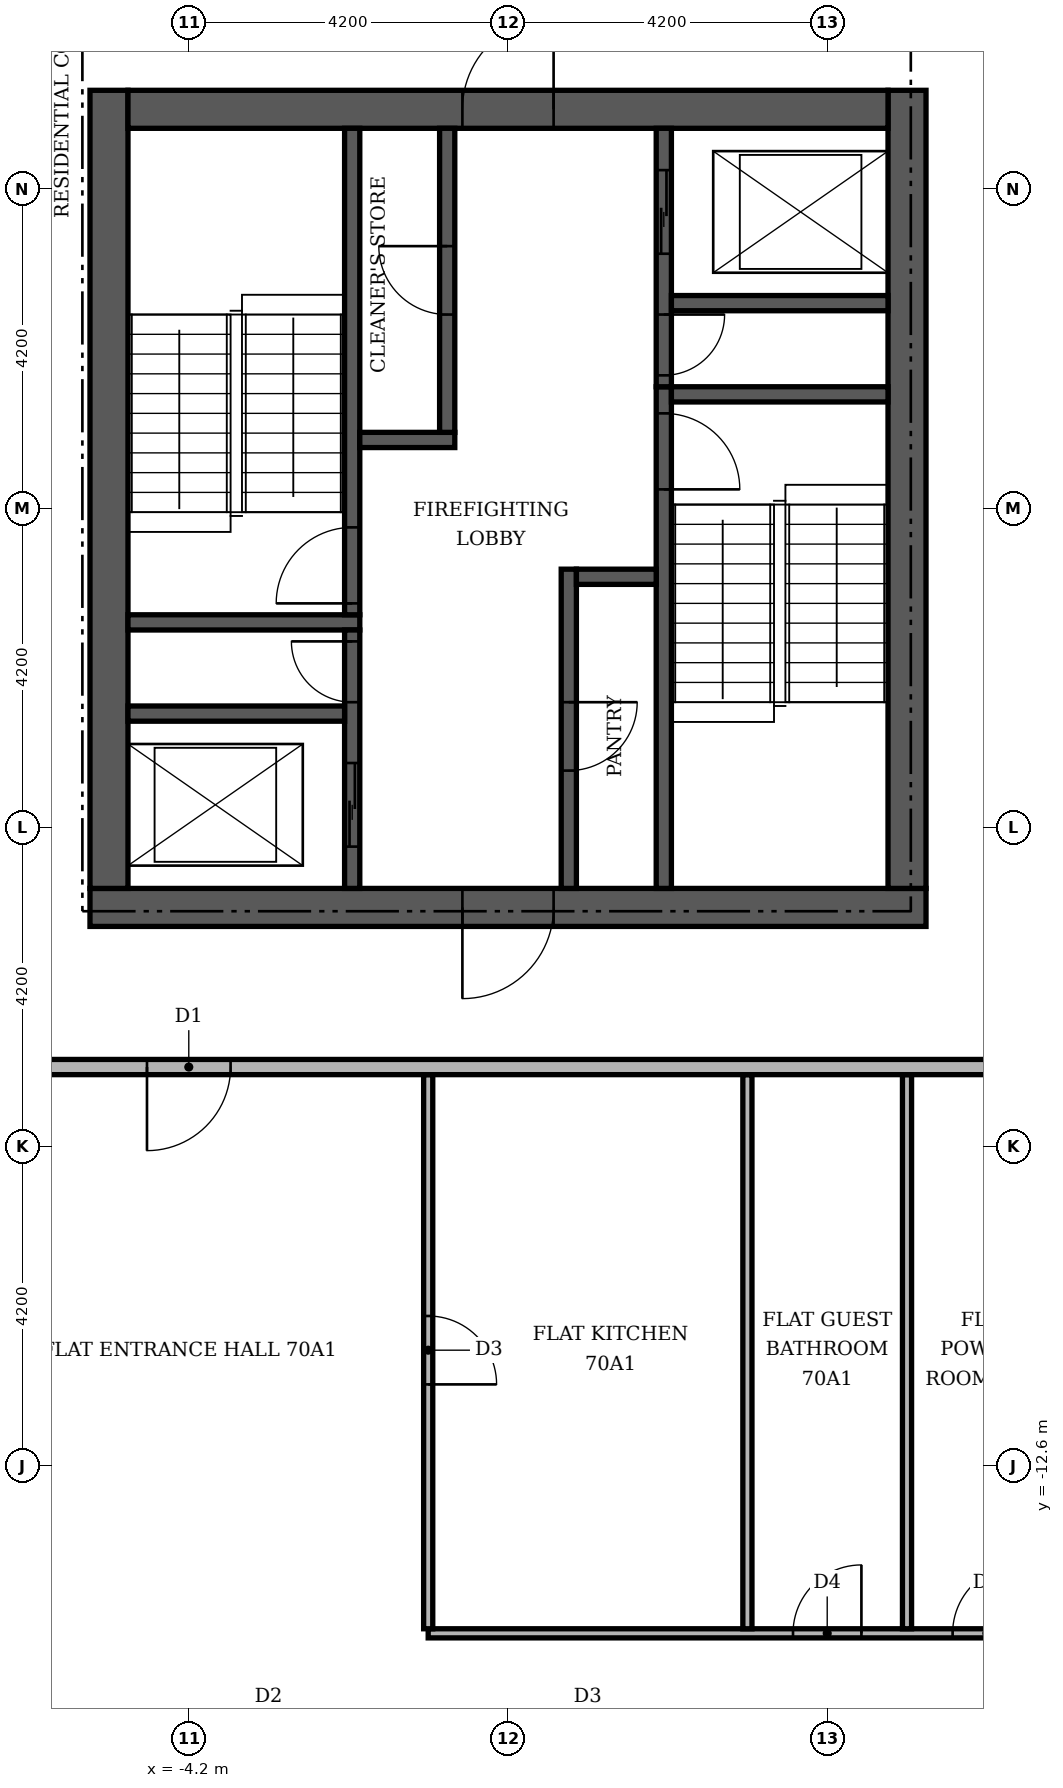
"""IFC4 building model, lengths in metres.
Left out: names, types, materials, properties, quantities, classifications, styles, units other than length and angle.
Written with IfcOpenShell. Run it as: python <this file> out.ifc"""

import sys

from ifc_helpers import new_model, si_unit, direction, frame, frame_2d, origin, place, context, subcontext, project, spatial, rectangle, extrude, element, fill, save


model = new_model("IFC4")
c1 = context("Model", 3, precision=1e-05, world=origin(), true_north=direction((0.0, 1.0)))
c2 = subcontext(c1, "Body", "Model", "MODEL_VIEW")
j1 = project(units=[si_unit("LENGTHUNIT", "METRE"), si_unit("PLANEANGLEUNIT", "RADIAN")], contexts=[c1])
p1 = place(None, origin())
s1 = spatial("IfcSite", under=j1, at=p1, CompositionType="ELEMENT")
p2 = place(p1, origin())
s2 = spatial("IfcBuilding", under=s1, at=p2, CompositionType="ELEMENT")
p3 = place(p2, frame((0.0, 0.0, 292.8)))
s3 = spatial("IfcBuildingStorey", under=s2, at=p3, CompositionType="ELEMENT", Elevation=292.8)
p4 = place(p3, frame((-5.5, -5.25, 0.0), z_axis=(0.0, 0.0, 1.0), x_axis=(1.0, 0.0, 0.0)))
e1 = element("IfcWall", 1, at=p4, inside=s3, PredefinedType="SHEAR", context=c2, shape_type="SweptSolid", body=[
    extrude(rectangle(XDim=11.0, YDim=0.5, at=frame_2d((5.5, 0.0))), origin(), (0.0, 0.0, 1.0), 3.55),
])
p5 = place(p4, frame((4.9, 0.0, 0.0)))
e2 = element("IfcOpeningElement", 2, at=p5, cuts=e1, PredefinedType="OPENING", context=c2, shape_type="SweptSolid", body=[
    extrude(rectangle(XDim=1.2, YDim=2.1, at=frame_2d((0.6, 1.05))), frame((0.0, 0.26, 0.0), z_axis=(0.0, -1.0, 0.0), x_axis=(1.0, 0.0, 0.0)), (0.0, 0.0, 1.0), 0.52),
])
for number, where, z_axis, x_axis in (
    (3, (-5.25, -5.0, 0.0), (0.0, 0.0, 1.0), (0.0, 1.0, 0.0)),
    (4, (5.25, -5.0, 0.0), (0.0, 0.0, 1.0), (0.0, 1.0, 0.0)),
):
    element("IfcWall", number, at=place(p3, frame(where, z_axis=z_axis, x_axis=x_axis)), inside=s3, PredefinedType="SHEAR", context=c2, shape_type="SweptSolid", body=[
        extrude(rectangle(XDim=10.5, YDim=0.5, at=frame_2d((5.25, 0.0))), origin(), (0.0, 0.0, 1.0), 3.55),
    ])
p6 = place(p3, frame((-5.0, 5.25, 0.0), z_axis=(0.0, 0.0, 1.0), x_axis=(1.0, 0.0, 0.0)))
e5 = element("IfcWall", 5, at=p6, inside=s3, PredefinedType="SHEAR", context=c2, shape_type="SweptSolid", body=[
    extrude(rectangle(XDim=10.0, YDim=0.5, at=frame_2d((5.0, 0.0))), origin(), (0.0, 0.0, 1.0), 3.55),
])
p7 = place(p6, frame((4.4, 0.0, 0.0)))
e6 = element("IfcOpeningElement", 6, at=p7, cuts=e5, PredefinedType="OPENING", context=c2, shape_type="SweptSolid", body=[
    extrude(rectangle(XDim=1.2, YDim=2.1, at=frame_2d((0.6, 1.05))), frame((0.0, 0.26, 0.0), z_axis=(0.0, -1.0, 0.0), x_axis=(1.0, 0.0, 0.0)), (0.0, 0.0, 1.0), 0.52),
])
p8 = place(p3, frame((2.05, -5.0, 0.0), z_axis=(0.0, 0.0, 1.0), x_axis=(0.0, 1.0, 0.0)))
e7 = element("IfcWall", 7, at=p8, inside=s3, PredefinedType="SHEAR", context=c2, shape_type="SweptSolid", body=[
    extrude(rectangle(XDim=6.6, YDim=0.2, at=frame_2d((3.3, 0.0))), origin(), (0.0, 0.0, 1.0), 3.55),
])
p9 = place(p8, frame((5.25, 0.0, 0.0)))
e8 = element("IfcOpeningElement", 8, at=p9, cuts=e7, PredefinedType="OPENING", context=c2, shape_type="SweptSolid", body=[
    extrude(rectangle(XDim=1.0, YDim=2.1, at=frame_2d((0.5, 1.05))), frame((0.0, 0.11, 0.0), z_axis=(0.0, -1.0, 0.0), x_axis=(1.0, 0.0, 0.0)), (0.0, 0.0, 1.0), 0.22),
])
p10 = place(p3, frame((-5.0, -1.5, 0.0), z_axis=(0.0, 0.0, 1.0), x_axis=(1.0, 0.0, 0.0)))
e9 = element("IfcWall", 9, at=p10, inside=s3, PredefinedType="SHEAR", context=c2, shape_type="SweptSolid", body=[
    extrude(rectangle(XDim=3.05, YDim=0.2, at=frame_2d((1.525, 0.0))), origin(), (0.0, 0.0, 1.0), 3.55),
])
p11 = place(p3, frame((-2.05, -1.4, 0.0), z_axis=(0.0, 0.0, 1.0), x_axis=(0.0, 1.0, 0.0)))
e10 = element("IfcWall", 10, at=p11, inside=s3, PredefinedType="SHEAR", context=c2, shape_type="SweptSolid", body=[
    extrude(rectangle(XDim=6.4, YDim=0.2, at=frame_2d((3.2, 0.0))), origin(), (0.0, 0.0, 1.0), 3.55),
])
p12 = place(p11, frame((0.15, 0.0, 0.0)))
e11 = element("IfcOpeningElement", 11, at=p12, cuts=e10, PredefinedType="OPENING", context=c2, shape_type="SweptSolid", body=[
    extrude(rectangle(XDim=1.0, YDim=2.1, at=frame_2d((0.5, 1.05))), frame((0.0, 0.11, 0.0), z_axis=(0.0, -1.0, 0.0), x_axis=(1.0, 0.0, 0.0)), (0.0, 0.0, 1.0), 0.22),
])
p13 = place(p3, frame((2.15, 1.5, 0.0), z_axis=(0.0, 0.0, 1.0), x_axis=(1.0, 0.0, 0.0)))
e12 = element("IfcWall", 12, at=p13, inside=s3, PredefinedType="SHEAR", context=c2, shape_type="SweptSolid", body=[
    extrude(rectangle(XDim=2.85, YDim=0.2, at=frame_2d((1.425, 0.0))), origin(), (0.0, 0.0, 1.0), 3.55),
])
p14 = place(p3, frame((-2.05, -5.0, 0.0), z_axis=(0.0, 0.0, 1.0), x_axis=(0.0, 1.0, 0.0)))
e13 = element("IfcWall", 13, at=p14, inside=s3, PredefinedType="SHEAR", context=c2, shape_type="SweptSolid", body=[
    extrude(rectangle(XDim=3.4, YDim=0.2, at=frame_2d((1.7, 0.0))), origin(), (0.0, 0.0, 1.0), 3.55),
])
p15 = place(p14, frame((0.55, 0.0, 0.0)))
e14 = element("IfcOpeningElement", 14, at=p15, cuts=e13, PredefinedType="OPENING", context=c2, shape_type="SweptSolid", body=[
    extrude(rectangle(XDim=1.1, YDim=2.1, at=frame_2d((0.55, 1.05))), frame((0.0, 0.11, 0.0), z_axis=(0.0, -1.0, 0.0), x_axis=(1.0, 0.0, 0.0)), (0.0, 0.0, 1.0), 0.22),
])
p16 = place(p14, frame((2.45, 0.0, 0.0)))
e15 = element("IfcOpeningElement", 15, at=p16, cuts=e13, PredefinedType="OPENING", context=c2, shape_type="SweptSolid", body=[
    extrude(rectangle(XDim=0.8, YDim=2.1, at=frame_2d((0.4, 1.05))), frame((0.0, 0.11, 0.0), z_axis=(0.0, -1.0, 0.0), x_axis=(1.0, 0.0, 0.0)), (0.0, 0.0, 1.0), 0.22),
])
p17 = place(p3, frame((0.8, -5.0, 0.0), z_axis=(0.0, 0.0, 1.0), x_axis=(0.0, 1.0, 0.0)))
e16 = element("IfcWall", 16, at=p17, inside=s3, PredefinedType="SHEAR", context=c2, shape_type="SweptSolid", body=[
    extrude(rectangle(XDim=4.2, YDim=0.2, at=frame_2d((2.1, 0.0))), origin(), (0.0, 0.0, 1.0), 3.55),
])
p18 = place(p17, frame((1.55, 0.0, 0.0)))
e17 = element("IfcOpeningElement", 17, at=p18, cuts=e16, PredefinedType="OPENING", context=c2, shape_type="SweptSolid", body=[
    extrude(rectangle(XDim=0.9, YDim=2.1, at=frame_2d((0.45, 1.05))), frame((0.0, 0.11, 0.0), z_axis=(0.0, -1.0, 0.0), x_axis=(1.0, 0.0, 0.0)), (0.0, 0.0, 1.0), 0.22),
])
p19 = place(p3, frame((-5.0, -2.7, 0.0), z_axis=(0.0, 0.0, 1.0), x_axis=(1.0, 0.0, 0.0)))
e18 = element("IfcWall", 18, at=p19, inside=s3, PredefinedType="SHEAR", context=c2, shape_type="SweptSolid", body=[
    extrude(rectangle(XDim=2.85, YDim=0.2, at=frame_2d((1.425, 0.0))), origin(), (0.0, 0.0, 1.0), 3.55),
])
p20 = place(p3, frame((0.9, -0.9, 0.0), z_axis=(0.0, 0.0, 1.0), x_axis=(1.0, 0.0, 0.0)))
e19 = element("IfcWall", 19, at=p20, inside=s3, PredefinedType="SHEAR", context=c2, shape_type="SweptSolid", body=[
    extrude(rectangle(XDim=1.05, YDim=0.2, at=frame_2d((0.525, 0.0))), origin(), (0.0, 0.0, 1.0), 3.55),
])
p21 = place(p3, frame((-1.95, 0.9, 0.0), z_axis=(0.0, 0.0, 1.0), x_axis=(1.0, 0.0, 0.0)))
e20 = element("IfcWall", 20, at=p21, inside=s3, PredefinedType="SHEAR", context=c2, shape_type="SweptSolid", body=[
    extrude(rectangle(XDim=1.25, YDim=0.2, at=frame_2d((0.625, 0.0))), origin(), (0.0, 0.0, 1.0), 3.55),
])
p22 = place(p3, frame((-0.8, 1.0, 0.0), z_axis=(0.0, 0.0, 1.0), x_axis=(0.0, 1.0, 0.0)))
e21 = element("IfcWall", 21, at=p22, inside=s3, PredefinedType="SHEAR", context=c2, shape_type="SweptSolid", body=[
    extrude(rectangle(XDim=4.0, YDim=0.2, at=frame_2d((2.0, 0.0))), origin(), (0.0, 0.0, 1.0), 3.55),
])
p23 = place(p22, frame((1.55, 0.0, 0.0)))
e22 = element("IfcOpeningElement", 22, at=p23, cuts=e21, PredefinedType="OPENING", context=c2, shape_type="SweptSolid", body=[
    extrude(rectangle(XDim=0.9, YDim=2.1, at=frame_2d((0.45, 1.05))), frame((0.0, 0.11, 0.0), z_axis=(0.0, -1.0, 0.0), x_axis=(1.0, 0.0, 0.0)), (0.0, 0.0, 1.0), 0.22),
])
p24 = place(p3, frame((2.05, 1.6, 0.0), z_axis=(0.0, 0.0, 1.0), x_axis=(0.0, 1.0, 0.0)))
e23 = element("IfcWall", 23, at=p24, inside=s3, PredefinedType="SHEAR", context=c2, shape_type="SweptSolid", body=[
    extrude(rectangle(XDim=3.4, YDim=0.2, at=frame_2d((1.7, 0.0))), origin(), (0.0, 0.0, 1.0), 3.55),
])
p25 = place(p24, frame((1.75, 0.0, 0.0)))
e24 = element("IfcOpeningElement", 24, at=p25, cuts=e23, PredefinedType="OPENING", context=c2, shape_type="SweptSolid", body=[
    extrude(rectangle(XDim=1.1, YDim=2.1, at=frame_2d((0.55, 1.05))), frame((0.0, 0.11, 0.0), z_axis=(0.0, -1.0, 0.0), x_axis=(1.0, 0.0, 0.0)), (0.0, 0.0, 1.0), 0.22),
])
p26 = place(p24, frame((0.15, 0.0, 0.0)))
e25 = element("IfcOpeningElement", 25, at=p26, cuts=e23, PredefinedType="OPENING", context=c2, shape_type="SweptSolid", body=[
    extrude(rectangle(XDim=0.8, YDim=2.1, at=frame_2d((0.4, 1.05))), frame((0.0, 0.11, 0.0), z_axis=(0.0, -1.0, 0.0), x_axis=(1.0, 0.0, 0.0)), (0.0, 0.0, 1.0), 0.22),
])
p27 = place(p3, frame((2.15, 2.7, 0.0), z_axis=(0.0, 0.0, 1.0), x_axis=(1.0, 0.0, 0.0)))
e26 = element("IfcWall", 26, at=p27, inside=s3, PredefinedType="SHEAR", context=c2, shape_type="SweptSolid", body=[
    extrude(rectangle(XDim=2.85, YDim=0.2, at=frame_2d((1.425, 0.0))), origin(), (0.0, 0.0, 1.0), 3.55),
])
p28 = place(p3, frame((-1.05, -14.8, 0.0), z_axis=(0.0, 0.0, 1.0), x_axis=(1.0, 0.0, 0.0)))
e27 = element("IfcWall", 27, at=p28, inside=s3, PredefinedType="PARTITIONING", context=c2, shape_type="SweptSolid", body=[
    extrude(rectangle(XDim=8.3, YDim=0.12, at=frame_2d((4.15, 0.0))), origin(), (0.0, 0.0, 1.0), 3.55),
])
p29 = place(p28, frame((4.8, 0.0, 0.0)))
e28 = element("IfcOpeningElement", 28, at=p29, cuts=e27, PredefinedType="OPENING", context=c2, shape_type="SweptSolid", body=[
    extrude(rectangle(XDim=0.9, YDim=2.1, at=frame_2d((0.45, 1.05))), frame((0.0, 0.07, 0.0), z_axis=(0.0, -1.0, 0.0), x_axis=(1.0, 0.0, 0.0)), (0.0, 0.0, 1.0), 0.14),
])
p30 = place(p28, frame((6.9, 0.0, 0.0)))
e29 = element("IfcOpeningElement", 29, at=p30, cuts=e27, PredefinedType="OPENING", context=c2, shape_type="SweptSolid", body=[
    extrude(rectangle(XDim=0.9, YDim=2.1, at=frame_2d((0.45, 1.05))), frame((0.0, 0.07, 0.0), z_axis=(0.0, -1.0, 0.0), x_axis=(1.0, 0.0, 0.0)), (0.0, 0.0, 1.0), 0.14),
])
p31 = place(p3, frame((-1.05, -14.74, 0.0), z_axis=(0.0, 0.0, 1.0), x_axis=(0.0, 1.0, 0.0)))
e30 = element("IfcWall", 30, at=p31, inside=s3, PredefinedType="PARTITIONING", context=c2, shape_type="SweptSolid", body=[
    extrude(rectangle(XDim=7.29, YDim=0.12, at=frame_2d((3.645, 0.0))), origin(), (0.0, 0.0, 1.0), 3.55),
])
p32 = place(p31, frame((3.215, 0.0, 0.0)))
e31 = element("IfcOpeningElement", 31, at=p32, cuts=e30, PredefinedType="OPENING", context=c2, shape_type="SweptSolid", body=[
    extrude(rectangle(XDim=0.9, YDim=2.1, at=frame_2d((0.45, 1.05))), frame((0.0, 0.07, 0.0), z_axis=(0.0, -1.0, 0.0), x_axis=(1.0, 0.0, 0.0)), (0.0, 0.0, 1.0), 0.14),
])
for number, where, z_axis, x_axis in (
    (32, (3.15, -14.74, 0.0), (0.0, 0.0, 1.0), (0.0, 1.0, 0.0)),
    (33, (5.25, -14.74, 0.0), (0.0, 0.0, 1.0), (0.0, 1.0, 0.0)),
):
    element("IfcWall", number, at=place(p3, frame(where, z_axis=z_axis, x_axis=x_axis)), inside=s3, PredefinedType="PARTITIONING", context=c2, shape_type="SweptSolid", body=[
        extrude(rectangle(XDim=7.29, YDim=0.12, at=frame_2d((3.645, 0.0))), origin(), (0.0, 0.0, 1.0), 3.55),
    ])
p33 = place(p3, frame((-21.3, -7.35, 0.0), z_axis=(0.0, 0.0, 1.0), x_axis=(1.0, 0.0, 0.0)))
e34 = element("IfcWall", 34, at=p33, inside=s3, PredefinedType="PARTITIONING", context=c2, shape_type="SweptSolid", body=[
    extrude(rectangle(XDim=28.65, YDim=0.2, at=frame_2d((14.325, 0.0))), origin(), (0.0, 0.0, 1.0), 3.55),
])
p34 = place(p33, frame((16.55, 0.0, 0.0)))
e35 = element("IfcOpeningElement", 35, at=p34, cuts=e34, PredefinedType="OPENING", context=c2, shape_type="SweptSolid", body=[
    extrude(rectangle(XDim=1.1, YDim=2.4, at=frame_2d((0.55, 1.2))), frame((0.0, 0.11, 0.0), z_axis=(0.0, -1.0, 0.0), x_axis=(1.0, 0.0, 0.0)), (0.0, 0.0, 1.0), 0.22),
])
p35 = place(p25, origin())
e36 = element("IfcDoor", 36, at=p35, inside=s3, OperationType="SLIDING_TO_LEFT", PredefinedType="DOOR", context=c2, shape_type="SweptSolid", body=[
    extrude(rectangle(XDim=1.1, YDim=2.1, at=frame_2d((0.55, 1.05))), frame((0.0, 0.025, 0.0), z_axis=(0.0, -1.0, 0.0), x_axis=(1.0, 0.0, 0.0)), (0.0, 0.0, 1.0), 0.05),
])
fill(e24, e36)
p36 = place(p15, origin())
e37 = element("IfcDoor", 37, at=p36, inside=s3, OperationType="SLIDING_TO_LEFT", PredefinedType="DOOR", context=c2, shape_type="SweptSolid", body=[
    extrude(rectangle(XDim=1.1, YDim=2.1, at=frame_2d((0.55, 1.05))), frame((0.0, 0.025, 0.0), z_axis=(0.0, -1.0, 0.0), x_axis=(1.0, 0.0, 0.0)), (0.0, 0.0, 1.0), 0.05),
])
fill(e14, e37)
p37 = place(p12, origin())
e38 = element("IfcDoor", 38, at=p37, inside=s3, OperationType="SINGLE_SWING_LEFT", PredefinedType="DOOR", context=c2, shape_type="SweptSolid", body=[
    extrude(rectangle(XDim=1.0, YDim=2.1, at=frame_2d((0.5, 1.05))), frame((0.0, 0.025, 0.0), z_axis=(0.0, -1.0, 0.0), x_axis=(1.0, 0.0, 0.0)), (0.0, 0.0, 1.0), 0.05),
])
fill(e11, e38)
p38 = place(p9, frame((1.0, 0.0, 0.0), z_axis=(0.0, 0.0, 1.0), x_axis=(-1.0, 0.0, 0.0)))
e39 = element("IfcDoor", 39, at=p38, inside=s3, OperationType="SINGLE_SWING_LEFT", PredefinedType="DOOR", context=c2, shape_type="SweptSolid", body=[
    extrude(rectangle(XDim=1.0, YDim=2.1, at=frame_2d((0.5, 1.05))), frame((0.0, 0.025, 0.0), z_axis=(0.0, -1.0, 0.0), x_axis=(1.0, 0.0, 0.0)), (0.0, 0.0, 1.0), 0.05),
])
fill(e8, e39)
p39 = place(p26, frame((0.8, 0.0, 0.0), z_axis=(0.0, 0.0, 1.0), x_axis=(-1.0, 0.0, 0.0)))
e40 = element("IfcDoor", 40, at=p39, inside=s3, OperationType="SINGLE_SWING_RIGHT", PredefinedType="DOOR", context=c2, shape_type="SweptSolid", body=[
    extrude(rectangle(XDim=0.8, YDim=2.1, at=frame_2d((0.4, 1.05))), frame((0.0, 0.025, 0.0), z_axis=(0.0, -1.0, 0.0), x_axis=(1.0, 0.0, 0.0)), (0.0, 0.0, 1.0), 0.05),
])
fill(e25, e40)
p40 = place(p16, origin())
e41 = element("IfcDoor", 41, at=p40, inside=s3, OperationType="SINGLE_SWING_RIGHT", PredefinedType="DOOR", context=c2, shape_type="SweptSolid", body=[
    extrude(rectangle(XDim=0.8, YDim=2.1, at=frame_2d((0.4, 1.05))), frame((0.0, 0.025, 0.0), z_axis=(0.0, -1.0, 0.0), x_axis=(1.0, 0.0, 0.0)), (0.0, 0.0, 1.0), 0.05),
])
fill(e15, e41)
p41 = place(p23, origin())
e42 = element("IfcDoor", 42, at=p41, inside=s3, OperationType="SINGLE_SWING_RIGHT", PredefinedType="DOOR", context=c2, shape_type="SweptSolid", body=[
    extrude(rectangle(XDim=0.9, YDim=2.1, at=frame_2d((0.45, 1.05))), frame((0.0, 0.025, 0.0), z_axis=(0.0, -1.0, 0.0), x_axis=(1.0, 0.0, 0.0)), (0.0, 0.0, 1.0), 0.05),
])
fill(e22, e42)
p42 = place(p18, frame((0.9, 0.0, 0.0), z_axis=(0.0, 0.0, 1.0), x_axis=(-1.0, 0.0, 0.0)))
e43 = element("IfcDoor", 43, at=p42, inside=s3, OperationType="SINGLE_SWING_RIGHT", PredefinedType="DOOR", context=c2, shape_type="SweptSolid", body=[
    extrude(rectangle(XDim=0.9, YDim=2.1, at=frame_2d((0.45, 1.05))), frame((0.0, 0.025, 0.0), z_axis=(0.0, -1.0, 0.0), x_axis=(1.0, 0.0, 0.0)), (0.0, 0.0, 1.0), 0.05),
])
fill(e17, e43)
p43 = place(p7, origin())
e44 = element("IfcDoor", 44, at=p43, inside=s3, OperationType="SINGLE_SWING_RIGHT", PredefinedType="DOOR", context=c2, shape_type="SweptSolid", body=[
    extrude(rectangle(XDim=1.2, YDim=2.1, at=frame_2d((0.6, 1.05))), frame((0.0, 0.025, 0.0), z_axis=(0.0, -1.0, 0.0), x_axis=(1.0, 0.0, 0.0)), (0.0, 0.0, 1.0), 0.05),
])
fill(e6, e44)
p44 = place(p5, frame((1.2, 0.0, 0.0), z_axis=(0.0, 0.0, 1.0), x_axis=(-1.0, 0.0, 0.0)))
e45 = element("IfcDoor", 45, at=p44, inside=s3, OperationType="SINGLE_SWING_LEFT", PredefinedType="DOOR", context=c2, shape_type="SweptSolid", body=[
    extrude(rectangle(XDim=1.2, YDim=2.1, at=frame_2d((0.6, 1.05))), frame((0.0, 0.025, 0.0), z_axis=(0.0, -1.0, 0.0), x_axis=(1.0, 0.0, 0.0)), (0.0, 0.0, 1.0), 0.05),
])
fill(e2, e45)
p45 = place(p34, frame((1.1, 0.0, 0.0), z_axis=(0.0, 0.0, 1.0), x_axis=(-1.0, 0.0, 0.0)))
e46 = element("IfcDoor", 46, at=p45, inside=s3, OperationType="SINGLE_SWING_LEFT", PredefinedType="DOOR", context=c2, shape_type="SweptSolid", body=[
    extrude(rectangle(XDim=1.1, YDim=2.4, at=frame_2d((0.55, 1.2))), frame((0.0, 0.025, 0.0), z_axis=(0.0, -1.0, 0.0), x_axis=(1.0, 0.0, 0.0)), (0.0, 0.0, 1.0), 0.05),
])
fill(e35, e46)
p46 = place(p32, frame((0.9, 0.0, 0.0), z_axis=(0.0, 0.0, 1.0), x_axis=(-1.0, 0.0, 0.0)))
e47 = element("IfcDoor", 47, at=p46, inside=s3, OperationType="SINGLE_SWING_LEFT", PredefinedType="DOOR", context=c2, shape_type="SweptSolid", body=[
    extrude(rectangle(XDim=0.9, YDim=2.1, at=frame_2d((0.45, 1.05))), frame((0.0, 0.025, 0.0), z_axis=(0.0, -1.0, 0.0), x_axis=(1.0, 0.0, 0.0)), (0.0, 0.0, 1.0), 0.05),
])
fill(e31, e47)
p47 = place(p29, origin())
e48 = element("IfcDoor", 48, at=p47, inside=s3, OperationType="SINGLE_SWING_RIGHT", PredefinedType="DOOR", context=c2, shape_type="SweptSolid", body=[
    extrude(rectangle(XDim=0.9, YDim=2.1, at=frame_2d((0.45, 1.05))), frame((0.0, 0.025, 0.0), z_axis=(0.0, -1.0, 0.0), x_axis=(1.0, 0.0, 0.0)), (0.0, 0.0, 1.0), 0.05),
])
fill(e28, e48)
p48 = place(p30, origin())
e49 = element("IfcDoor", 49, at=p48, inside=s3, OperationType="SINGLE_SWING_RIGHT", PredefinedType="DOOR", context=c2, shape_type="SweptSolid", body=[
    extrude(rectangle(XDim=0.9, YDim=2.1, at=frame_2d((0.45, 1.05))), frame((0.0, 0.025, 0.0), z_axis=(0.0, -1.0, 0.0), x_axis=(1.0, 0.0, 0.0)), (0.0, 0.0, 1.0), 0.05),
])
fill(e29, e49)
save(model, sys.argv[1])
